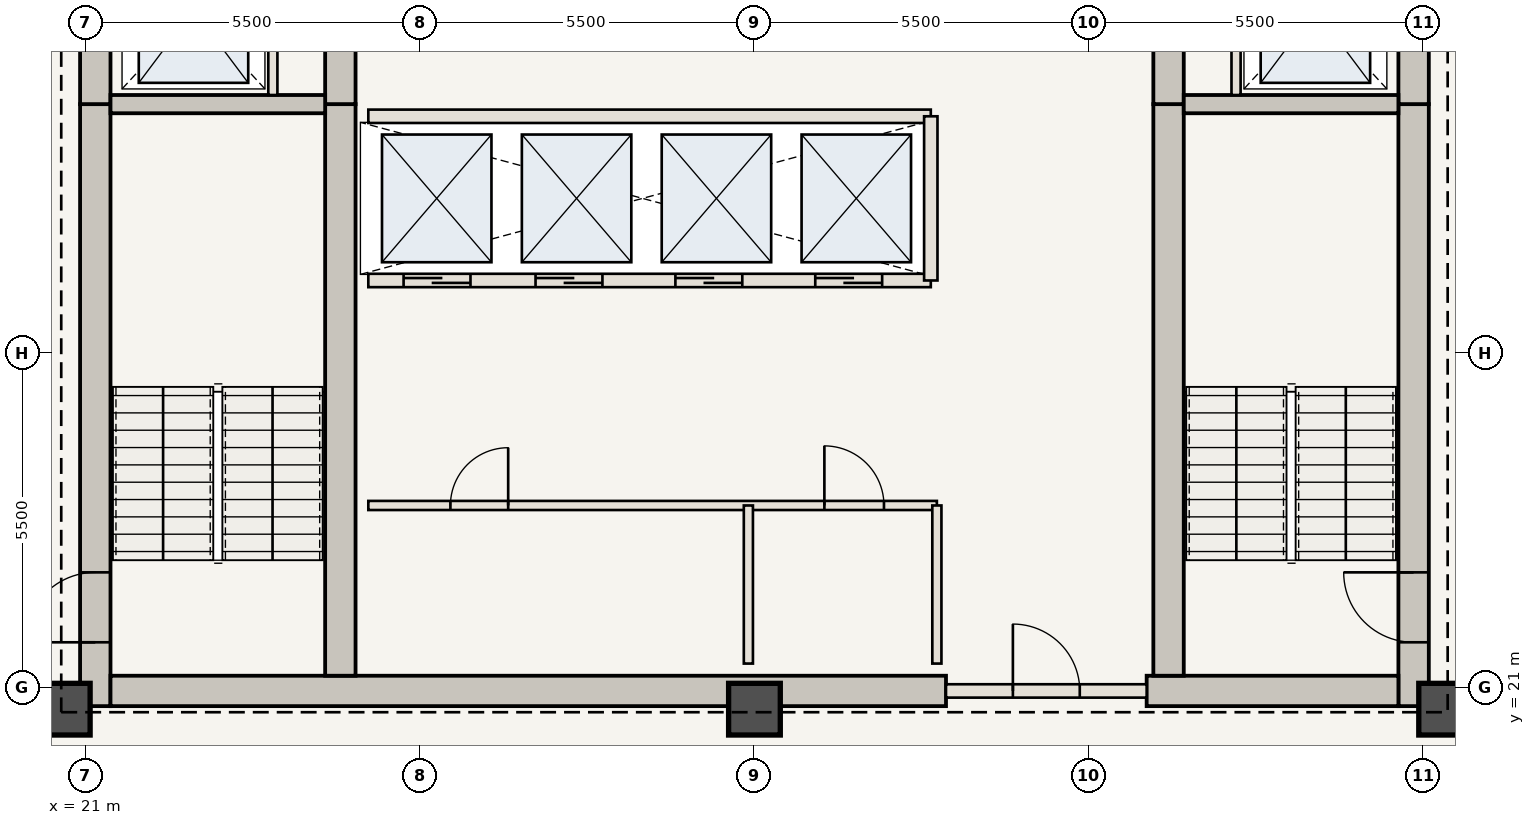
"""IFC4 building model, lengths in metres.
Left out: names, types, materials, properties, quantities, classifications, styles, units other than length and angle.
Written with IfcOpenShell. Run it as: python <this file> out.ifc"""

import sys

from ifc_helpers import new_model, si_unit, direction, frame, frame_2d, origin, origin_2d, place, context, subcontext, project, spatial, rectangle, extrude, element, fill, save


model = new_model("IFC4")
c1 = context("Model", 3, precision=1e-05, world=origin(), true_north=direction((0.0, 1.0)))
c2 = subcontext(c1, "Body", "Model", "MODEL_VIEW")
j1 = project(units=[si_unit("LENGTHUNIT", "METRE"), si_unit("PLANEANGLEUNIT", "RADIAN")], contexts=[c1])
p1 = place(None, origin())
s1 = spatial("IfcSite", under=j1, at=p1, CompositionType="ELEMENT")
p2 = place(p1, origin())
s2 = spatial("IfcBuilding", under=s1, at=p2, CompositionType="ELEMENT")
p3 = place(p2, frame((0.0, 0.0, 194.6)))
s3 = spatial("IfcBuildingStorey", under=s2, at=p3, CompositionType="ELEMENT", Elevation=194.6)
p4 = place(p3, frame((21.16, 20.7, 0.0), z_axis=(0.0, 0.0, 1.0), x_axis=(0.0, 1.0, 0.0)))
e1 = element("IfcWall", 1, at=p4, inside=s3, PredefinedType="SHEAR", context=c2, shape_type="SweptSolid", body=[
    extrude(rectangle(XDim=9.9, YDim=0.5, at=frame_2d((4.95, 0.0))), origin(), (0.0, 0.0, 1.0), 3.85),
])
p5 = place(p4, frame((1.05, 0.0, 0.0)))
e2 = element("IfcOpeningElement", 2, at=p5, cuts=e1, PredefinedType="OPENING", context=c2, shape_type="SweptSolid", body=[
    extrude(rectangle(XDim=1.15, YDim=2.15, at=frame_2d((0.575, 1.075))), frame((0.0, 0.26, 0.0), z_axis=(0.0, -1.0, 0.0), x_axis=(1.0, 0.0, 0.0)), (0.0, 0.0, 1.0), 0.52),
])
p6 = place(p3, frame((21.16, 30.6, 0.0), z_axis=(0.0, 0.0, 1.0), x_axis=(0.0, 1.0, 0.0)))
e3 = element("IfcWall", 3, at=p6, inside=s3, PredefinedType="SHEAR", context=c2, shape_type="SweptSolid", body=[
    extrude(rectangle(XDim=12.65, YDim=0.5, at=frame_2d((6.325, 0.0))), origin(), (0.0, 0.0, 1.0), 3.85),
])
p7 = place(p6, frame((4.2, 0.0, 0.0)))
e4 = element("IfcOpeningElement", 4, at=p7, cuts=e3, PredefinedType="OPENING", context=c2, shape_type="SweptSolid", body=[
    extrude(rectangle(XDim=1.1, YDim=2.15, at=frame_2d((0.55, 1.075))), frame((0.0, 0.26, 0.0), z_axis=(0.0, -1.0, 0.0), x_axis=(1.0, 0.0, 0.0)), (0.0, 0.0, 1.0), 0.52),
])
p8 = place(p6, frame((8.05, 0.0, 0.0)))
e5 = element("IfcOpeningElement", 5, at=p8, cuts=e3, PredefinedType="OPENING", context=c2, shape_type="SweptSolid", body=[
    extrude(rectangle(XDim=0.92, YDim=2.1, at=frame_2d((0.46, 1.05))), frame((0.0, 0.26, 0.0), z_axis=(0.0, -1.0, 0.0), x_axis=(1.0, 0.0, 0.0)), (0.0, 0.0, 1.0), 0.52),
])
p9 = place(p6, frame((9.45, 0.0, 0.0)))
e6 = element("IfcOpeningElement", 6, at=p9, cuts=e3, PredefinedType="OPENING", context=c2, shape_type="SweptSolid", body=[
    extrude(rectangle(XDim=0.88, YDim=2.1, at=frame_2d((0.44, 1.05))), frame((0.0, 0.26, 0.0), z_axis=(0.0, -1.0, 0.0), x_axis=(1.0, 0.0, 0.0)), (0.0, 0.0, 1.0), 0.52),
])
p10 = place(p6, frame((10.85, 0.0, 0.0)))
e7 = element("IfcOpeningElement", 7, at=p10, cuts=e3, PredefinedType="OPENING", context=c2, shape_type="SweptSolid", body=[
    extrude(rectangle(XDim=0.88, YDim=2.1, at=frame_2d((0.44, 1.05))), frame((0.0, 0.26, 0.0), z_axis=(0.0, -1.0, 0.0), x_axis=(1.0, 0.0, 0.0)), (0.0, 0.0, 1.0), 0.52),
])
p11 = place(p3, frame((42.84, 20.7, 0.0), z_axis=(0.0, 0.0, 1.0), x_axis=(0.0, 1.0, 0.0)))
e8 = element("IfcWall", 8, at=p11, inside=s3, PredefinedType="SHEAR", context=c2, shape_type="SweptSolid", body=[
    extrude(rectangle(XDim=9.9, YDim=0.5, at=frame_2d((4.95, 0.0))), origin(), (0.0, 0.0, 1.0), 3.85),
])
p12 = place(p11, frame((1.05, 0.0, 0.0)))
e9 = element("IfcOpeningElement", 9, at=p12, cuts=e8, PredefinedType="OPENING", context=c2, shape_type="SweptSolid", body=[
    extrude(rectangle(XDim=1.15, YDim=2.15, at=frame_2d((0.575, 1.075))), frame((0.0, 0.26, 0.0), z_axis=(0.0, -1.0, 0.0), x_axis=(1.0, 0.0, 0.0)), (0.0, 0.0, 1.0), 0.52),
])
p13 = place(p3, frame((42.84, 30.6, 0.0), z_axis=(0.0, 0.0, 1.0), x_axis=(0.0, 1.0, 0.0)))
e10 = element("IfcWall", 10, at=p13, inside=s3, PredefinedType="SHEAR", context=c2, shape_type="SweptSolid", body=[
    extrude(rectangle(XDim=12.65, YDim=0.5, at=frame_2d((6.325, 0.0))), origin(), (0.0, 0.0, 1.0), 3.85),
])
p14 = place(p13, frame((4.2, 0.0, 0.0)))
e11 = element("IfcOpeningElement", 11, at=p14, cuts=e10, PredefinedType="OPENING", context=c2, shape_type="SweptSolid", body=[
    extrude(rectangle(XDim=1.1, YDim=2.15, at=frame_2d((0.55, 1.075))), frame((0.0, 0.26, 0.0), z_axis=(0.0, -1.0, 0.0), x_axis=(1.0, 0.0, 0.0)), (0.0, 0.0, 1.0), 0.52),
])
p15 = place(p13, frame((9.2, 0.0, 0.0)))
e12 = element("IfcOpeningElement", 12, at=p15, cuts=e10, PredefinedType="OPENING", context=c2, shape_type="SweptSolid", body=[
    extrude(rectangle(XDim=0.92, YDim=2.1, at=frame_2d((0.46, 1.05))), frame((0.0, 0.26, 0.0), z_axis=(0.0, -1.0, 0.0), x_axis=(1.0, 0.0, 0.0)), (0.0, 0.0, 1.0), 0.52),
])
p16 = place(p3, frame((21.41, 20.95, 0.0), z_axis=(0.0, 0.0, 1.0), x_axis=(1.0, 0.0, 0.0)))
e13 = element("IfcWall", 13, at=p16, inside=s3, PredefinedType="SHEAR", context=c2, shape_type="SweptSolid", body=[
    extrude(rectangle(XDim=13.74, YDim=0.5, at=frame_2d((6.87, 0.0))), origin(), (0.0, 0.0, 1.0), 3.85),
])
p17 = place(p3, frame((38.45, 20.95, 0.0), z_axis=(0.0, 0.0, 1.0), x_axis=(1.0, 0.0, 0.0)))
e14 = element("IfcWall", 14, at=p17, inside=s3, PredefinedType="SHEAR", context=c2, shape_type="SweptSolid", body=[
    extrude(rectangle(XDim=4.14, YDim=0.5, at=frame_2d((2.07, 0.0))), origin(), (0.0, 0.0, 1.0), 3.85),
])
p18 = place(p3, frame((25.19, 21.2, 0.0), z_axis=(0.0, 0.0, 1.0), x_axis=(0.0, 1.0, 0.0)))
e15 = element("IfcWall", 15, at=p18, inside=s3, PredefinedType="SHEAR", context=c2, shape_type="SweptSolid", body=[
    extrude(rectangle(XDim=9.4, YDim=0.5, at=frame_2d((4.7, 0.0))), origin(), (0.0, 0.0, 1.0), 3.85),
])
p19 = place(p3, frame((25.19, 30.6, 0.0), z_axis=(0.0, 0.0, 1.0), x_axis=(0.0, 1.0, 0.0)))
e16 = element("IfcWall", 16, at=p19, inside=s3, PredefinedType="SHEAR", context=c2, shape_type="SweptSolid", body=[
    extrude(rectangle(XDim=12.15, YDim=0.5, at=frame_2d((6.075, 0.0))), origin(), (0.0, 0.0, 1.0), 3.85),
])
p20 = place(p19, frame((6.25, 0.0, 0.0)))
e17 = element("IfcOpeningElement", 17, at=p20, cuts=e16, PredefinedType="OPENING", context=c2, shape_type="SweptSolid", body=[
    extrude(rectangle(XDim=1.1, YDim=2.15, at=frame_2d((0.55, 1.075))), frame((0.0, 0.26, 0.0), z_axis=(0.0, -1.0, 0.0), x_axis=(1.0, 0.0, 0.0)), (0.0, 0.0, 1.0), 0.52),
])
p21 = place(p3, frame((38.81, 21.2, 0.0), z_axis=(0.0, 0.0, 1.0), x_axis=(0.0, 1.0, 0.0)))
e18 = element("IfcWall", 18, at=p21, inside=s3, PredefinedType="SHEAR", context=c2, shape_type="SweptSolid", body=[
    extrude(rectangle(XDim=9.4, YDim=0.5, at=frame_2d((4.7, 0.0))), origin(), (0.0, 0.0, 1.0), 3.85),
])
p22 = place(p3, frame((38.81, 30.6, 0.0), z_axis=(0.0, 0.0, 1.0), x_axis=(0.0, 1.0, 0.0)))
e19 = element("IfcWall", 19, at=p22, inside=s3, PredefinedType="SHEAR", context=c2, shape_type="SweptSolid", body=[
    extrude(rectangle(XDim=12.15, YDim=0.5, at=frame_2d((6.075, 0.0))), origin(), (0.0, 0.0, 1.0), 3.85),
])
for number, where, z_axis, x_axis in (
    (20, (20.65, 20.65, 0.0), (0.0, 0.0, 1.0), (1.0, 0.0, 0.0)),
    (21, (32.0, 20.65, 0.0), (0.0, 0.0, 1.0), (1.0, 0.0, 0.0)),
    (22, (43.35, 20.65, 0.0), (0.0, 0.0, 1.0), (1.0, 0.0, 0.0)),
):
    element("IfcColumn", number, at=place(p3, frame(where, z_axis=z_axis, x_axis=x_axis)), inside=s3, PredefinedType="COLUMN", context=c2, shape_type="SweptSolid", body=[
        extrude(rectangle(XDim=0.85, YDim=0.85, at=origin_2d()), origin(), (0.0, 0.0, 1.0), 3.85),
    ])
for number, where, z_axis, x_axis in (
    (23, (21.41, 30.6, 0.0), (0.0, 0.0, 1.0), (1.0, 0.0, 0.0)),
    (24, (39.06, 30.6, 0.0), (0.0, 0.0, 1.0), (1.0, 0.0, 0.0)),
):
    element("IfcWall", number, at=place(p3, frame(where, z_axis=z_axis, x_axis=x_axis)), inside=s3, PredefinedType="SHEAR", context=c2, shape_type="SweptSolid", body=[
        extrude(rectangle(XDim=3.53, YDim=0.3, at=frame_2d((1.765, 0.0))), origin(), (0.0, 0.0, 1.0), 3.685),
    ])
for number, where, z_axis, x_axis in (
    (25, (24.08, 30.75, 0.0), (0.0, 0.0, 1.0), (0.0, 1.0, 0.0)),
    (26, (39.92, 30.75, 0.0), (0.0, 0.0, 1.0), (0.0, 1.0, 0.0)),
):
    element("IfcWall", number, at=place(p3, frame(where, z_axis=z_axis, x_axis=x_axis)), inside=s3, PredefinedType="STANDARD", context=c2, shape_type="SweptSolid", body=[
        extrude(rectangle(XDim=2.65, YDim=0.15, at=frame_2d((1.325, 0.0))), origin(), (0.0, 0.0, 1.0), 3.685),
    ])
p23 = place(p3, frame((35.15, 20.95, 0.0), z_axis=(0.0, 0.0, 1.0), x_axis=(1.0, 0.0, 0.0)))
e27 = element("IfcWall", 27, at=p23, inside=s3, PredefinedType="STANDARD", context=c2, shape_type="SweptSolid", body=[
    extrude(rectangle(XDim=3.3, YDim=0.22, at=frame_2d((1.65, 0.0))), origin(), (0.0, 0.0, 1.0), 3.685),
])
p24 = place(p23, frame((1.1, 0.0, 0.0)))
e28 = element("IfcOpeningElement", 28, at=p24, cuts=e27, PredefinedType="OPENING", context=c2, shape_type="SweptSolid", body=[
    extrude(rectangle(XDim=1.1, YDim=2.15, at=frame_2d((0.55, 1.075))), frame((0.0, 0.12, 0.0), z_axis=(0.0, -1.0, 0.0), x_axis=(1.0, 0.0, 0.0)), (0.0, 0.0, 1.0), 0.24),
])
p25 = place(p3, frame((25.65, 24.0, 0.0), z_axis=(0.0, 0.0, 1.0), x_axis=(1.0, 0.0, 0.0)))
e29 = element("IfcWall", 29, at=p25, inside=s3, PredefinedType="STANDARD", context=c2, shape_type="SweptSolid", body=[
    extrude(rectangle(XDim=9.35, YDim=0.15, at=frame_2d((4.675, 0.0))), origin(), (0.0, 0.0, 1.0), 3.685),
])
p26 = place(p25, frame((1.35, 0.0, 0.0)))
e30 = element("IfcOpeningElement", 30, at=p26, cuts=e29, PredefinedType="OPENING", context=c2, shape_type="SweptSolid", body=[
    extrude(rectangle(XDim=0.95, YDim=2.15, at=frame_2d((0.475, 1.075))), frame((0.0, 0.085, 0.0), z_axis=(0.0, -1.0, 0.0), x_axis=(1.0, 0.0, 0.0)), (0.0, 0.0, 1.0), 0.17),
])
p27 = place(p25, frame((7.5, 0.0, 0.0)))
e31 = element("IfcOpeningElement", 31, at=p27, cuts=e29, PredefinedType="OPENING", context=c2, shape_type="SweptSolid", body=[
    extrude(rectangle(XDim=0.98, YDim=2.2, at=frame_2d((0.49, 1.1))), frame((0.0, 0.085, 0.0), z_axis=(0.0, -1.0, 0.0), x_axis=(1.0, 0.0, 0.0)), (0.0, 0.0, 1.0), 0.17),
])
for number, where, z_axis, x_axis in (
    (32, (31.9, 21.4, 0.0), (0.0, 0.0, 1.0), (0.0, 1.0, 0.0)),
    (33, (35.0, 21.4, 0.0), (0.0, 0.0, 1.0), (0.0, 1.0, 0.0)),
):
    element("IfcWall", number, at=place(p3, frame(where, z_axis=z_axis, x_axis=x_axis)), inside=s3, PredefinedType="STANDARD", context=c2, shape_type="SweptSolid", body=[
        extrude(rectangle(XDim=2.6, YDim=0.15, at=frame_2d((1.3, 0.0))), origin(), (0.0, 0.0, 1.0), 3.685),
    ])
p28 = place(p3, frame((25.65, 27.7, 0.0), z_axis=(0.0, 0.0, 1.0), x_axis=(1.0, 0.0, 0.0)))
e34 = element("IfcWall", 34, at=p28, inside=s3, PredefinedType="STANDARD", context=c2, shape_type="SweptSolid", body=[
    extrude(rectangle(XDim=9.25, YDim=0.22, at=frame_2d((4.625, 0.0))), origin(), (0.0, 0.0, 1.0), 3.685),
])
p29 = place(p28, frame((0.58, 0.0, 0.0)))
e35 = element("IfcOpeningElement", 35, at=p29, cuts=e34, PredefinedType="OPENING", context=c2, shape_type="SweptSolid", body=[
    extrude(rectangle(XDim=1.1, YDim=2.15, at=frame_2d((0.55, 1.075))), frame((0.0, 0.12, 0.0), z_axis=(0.0, -1.0, 0.0), x_axis=(1.0, 0.0, 0.0)), (0.0, 0.0, 1.0), 0.24),
])
p30 = place(p28, frame((2.75, 0.0, 0.0)))
e36 = element("IfcOpeningElement", 36, at=p30, cuts=e34, PredefinedType="OPENING", context=c2, shape_type="SweptSolid", body=[
    extrude(rectangle(XDim=1.1, YDim=2.15, at=frame_2d((0.55, 1.075))), frame((0.0, 0.12, 0.0), z_axis=(0.0, -1.0, 0.0), x_axis=(1.0, 0.0, 0.0)), (0.0, 0.0, 1.0), 0.24),
])
p31 = place(p28, frame((5.05, 0.0, 0.0)))
e37 = element("IfcOpeningElement", 37, at=p31, cuts=e34, PredefinedType="OPENING", context=c2, shape_type="SweptSolid", body=[
    extrude(rectangle(XDim=1.1, YDim=2.15, at=frame_2d((0.55, 1.075))), frame((0.0, 0.12, 0.0), z_axis=(0.0, -1.0, 0.0), x_axis=(1.0, 0.0, 0.0)), (0.0, 0.0, 1.0), 0.24),
])
p32 = place(p28, frame((7.35, 0.0, 0.0)))
e38 = element("IfcOpeningElement", 38, at=p32, cuts=e34, PredefinedType="OPENING", context=c2, shape_type="SweptSolid", body=[
    extrude(rectangle(XDim=1.1, YDim=2.15, at=frame_2d((0.55, 1.075))), frame((0.0, 0.12, 0.0), z_axis=(0.0, -1.0, 0.0), x_axis=(1.0, 0.0, 0.0)), (0.0, 0.0, 1.0), 0.24),
])
p33 = place(p3, frame((25.65, 30.4, 0.0), z_axis=(0.0, 0.0, 1.0), x_axis=(1.0, 0.0, 0.0)))
e39 = element("IfcWall", 39, at=p33, inside=s3, PredefinedType="STANDARD", context=c2, shape_type="SweptSolid", body=[
    extrude(rectangle(XDim=9.25, YDim=0.22, at=frame_2d((4.625, 0.0))), origin(), (0.0, 0.0, 1.0), 3.685),
])
p34 = place(p3, frame((34.9, 27.7, 0.0), z_axis=(0.0, 0.0, 1.0), x_axis=(0.0, 1.0, 0.0)))
e40 = element("IfcWall", 40, at=p34, inside=s3, PredefinedType="STANDARD", context=c2, shape_type="SweptSolid", body=[
    extrude(rectangle(XDim=2.7, YDim=0.22, at=frame_2d((1.35, 0.0))), origin(), (0.0, 0.0, 1.0), 3.685),
])
p35 = place(p5, origin())
e41 = element("IfcDoor", 41, at=p35, inside=s3, OperationType="SINGLE_SWING_LEFT", PredefinedType="DOOR", context=c2, shape_type="SweptSolid", body=[
    extrude(rectangle(XDim=1.15, YDim=2.15, at=frame_2d((0.575, 1.075))), frame((0.0, 0.025, 0.0), z_axis=(0.0, -1.0, 0.0), x_axis=(1.0, 0.0, 0.0)), (0.0, 0.0, 1.0), 0.05),
])
fill(e2, e41)
p36 = place(p12, origin())
e42 = element("IfcDoor", 42, at=p36, inside=s3, OperationType="SINGLE_SWING_RIGHT", PredefinedType="DOOR", context=c2, shape_type="SweptSolid", body=[
    extrude(rectangle(XDim=1.15, YDim=2.15, at=frame_2d((0.575, 1.075))), frame((0.0, 0.025, 0.0), z_axis=(0.0, -1.0, 0.0), x_axis=(1.0, 0.0, 0.0)), (0.0, 0.0, 1.0), 0.05),
])
fill(e9, e42)
p37 = place(p24, origin())
e43 = element("IfcDoor", 43, at=p37, inside=s3, OperationType="SINGLE_SWING_LEFT", PredefinedType="DOOR", context=c2, shape_type="SweptSolid", body=[
    extrude(rectangle(XDim=1.1, YDim=2.15, at=frame_2d((0.55, 1.075))), frame((0.0, 0.025, 0.0), z_axis=(0.0, -1.0, 0.0), x_axis=(1.0, 0.0, 0.0)), (0.0, 0.0, 1.0), 0.05),
])
fill(e28, e43)
p38 = place(p26, origin())
e44 = element("IfcDoor", 44, at=p38, inside=s3, OperationType="SINGLE_SWING_RIGHT", PredefinedType="DOOR", context=c2, shape_type="SweptSolid", body=[
    extrude(rectangle(XDim=0.95, YDim=2.15, at=frame_2d((0.475, 1.075))), frame((0.0, 0.025, 0.0), z_axis=(0.0, -1.0, 0.0), x_axis=(1.0, 0.0, 0.0)), (0.0, 0.0, 1.0), 0.05),
])
fill(e30, e44)
p39 = place(p27, origin())
e45 = element("IfcDoor", 45, at=p39, inside=s3, OperationType="SINGLE_SWING_LEFT", PredefinedType="DOOR", context=c2, shape_type="SweptSolid", body=[
    extrude(rectangle(XDim=0.98, YDim=2.2, at=frame_2d((0.49, 1.1))), frame((0.0, 0.025, 0.0), z_axis=(0.0, -1.0, 0.0), x_axis=(1.0, 0.0, 0.0)), (0.0, 0.0, 1.0), 0.05),
])
fill(e31, e45)
p40 = place(p29, origin())
e46 = element("IfcDoor", 46, at=p40, inside=s3, OperationType="DOUBLE_DOOR_SLIDING", PredefinedType="DOOR", context=c2, shape_type="SweptSolid", body=[
    extrude(rectangle(XDim=1.1, YDim=2.15, at=frame_2d((0.55, 1.075))), frame((0.0, 0.025, 0.0), z_axis=(0.0, -1.0, 0.0), x_axis=(1.0, 0.0, 0.0)), (0.0, 0.0, 1.0), 0.05),
])
fill(e35, e46)
p41 = place(p30, origin())
e47 = element("IfcDoor", 47, at=p41, inside=s3, OperationType="DOUBLE_DOOR_SLIDING", PredefinedType="DOOR", context=c2, shape_type="SweptSolid", body=[
    extrude(rectangle(XDim=1.1, YDim=2.15, at=frame_2d((0.55, 1.075))), frame((0.0, 0.025, 0.0), z_axis=(0.0, -1.0, 0.0), x_axis=(1.0, 0.0, 0.0)), (0.0, 0.0, 1.0), 0.05),
])
fill(e36, e47)
p42 = place(p31, origin())
e48 = element("IfcDoor", 48, at=p42, inside=s3, OperationType="DOUBLE_DOOR_SLIDING", PredefinedType="DOOR", context=c2, shape_type="SweptSolid", body=[
    extrude(rectangle(XDim=1.1, YDim=2.15, at=frame_2d((0.55, 1.075))), frame((0.0, 0.025, 0.0), z_axis=(0.0, -1.0, 0.0), x_axis=(1.0, 0.0, 0.0)), (0.0, 0.0, 1.0), 0.05),
])
fill(e37, e48)
p43 = place(p32, origin())
e49 = element("IfcDoor", 49, at=p43, inside=s3, OperationType="DOUBLE_DOOR_SLIDING", PredefinedType="DOOR", context=c2, shape_type="SweptSolid", body=[
    extrude(rectangle(XDim=1.1, YDim=2.15, at=frame_2d((0.55, 1.075))), frame((0.0, 0.025, 0.0), z_axis=(0.0, -1.0, 0.0), x_axis=(1.0, 0.0, 0.0)), (0.0, 0.0, 1.0), 0.05),
])
fill(e38, e49)
save(model, sys.argv[1])
